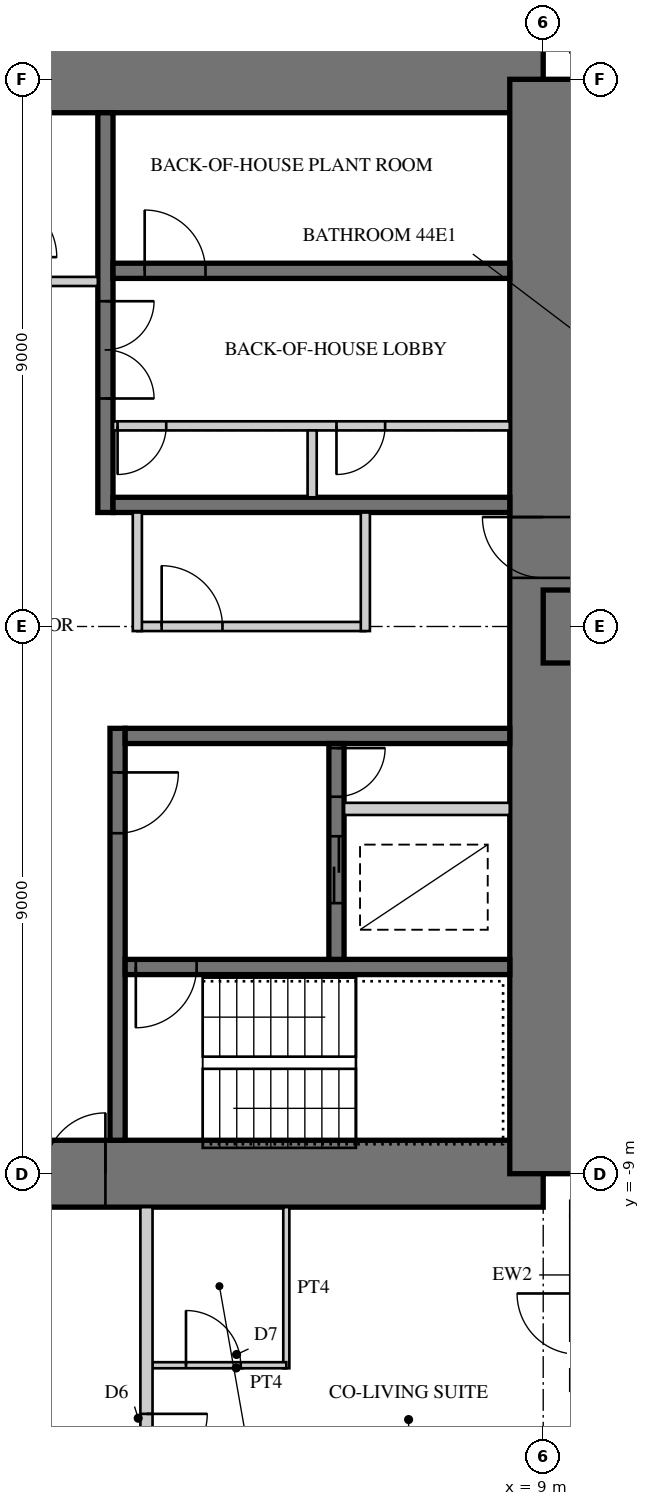
"""IFC4 building model, lengths in metres.
Left out: names, types, materials, properties, quantities, classifications, styles, units other than length and angle.
Written with IfcOpenShell. Run it as: python <this file> out.ifc"""

import sys

from ifc_helpers import new_model, si_unit, direction, frame, frame_2d, origin, place, context, subcontext, project, spatial, rectangle, extrude, element, fill, save


model = new_model("IFC4")
c1 = context("Model", 3, precision=1e-05, world=origin(), true_north=direction((0.0, 1.0)))
c2 = subcontext(c1, "Body", "Model", "MODEL_VIEW")
j1 = project(units=[si_unit("LENGTHUNIT", "METRE"), si_unit("PLANEANGLEUNIT", "RADIAN")], contexts=[c1])
p1 = place(None, origin())
s1 = spatial("IfcSite", under=j1, at=p1, CompositionType="ELEMENT")
p2 = place(p1, origin())
s2 = spatial("IfcBuilding", under=s1, at=p2, CompositionType="ELEMENT")
p3 = place(p2, frame((0.0, 0.0, 179.7)))
s3 = spatial("IfcBuildingStorey", under=s2, at=p3, CompositionType="ELEMENT", Elevation=179.7)
p4 = place(p3, frame((9.0, 9.0, 0.0), z_axis=(0.0, 0.0, 1.0), x_axis=(-1.0, 0.0, 0.0)))
e1 = element("IfcWall", 1, at=p4, inside=s3, PredefinedType="SHEAR", context=c2, shape_type="SweptSolid", body=[
    extrude(rectangle(XDim=18.0, YDim=1.1, at=frame_2d((9.0, 0.0))), origin(), (0.0, 0.0, 1.0), 3.4),
])
p5 = place(p4, frame((9.8, 0.0, 0.0)))
e2 = element("IfcOpeningElement", 2, at=p5, cuts=e1, PredefinedType="OPENING", context=c2, shape_type="SweptSolid", body=[
    extrude(rectangle(XDim=1.0, YDim=2.4, at=frame_2d((0.5, 1.2))), frame((0.0, 0.56, 0.0), z_axis=(0.0, -1.0, 0.0), x_axis=(1.0, 0.0, 0.0)), (0.0, 0.0, 1.0), 1.12),
])
p6 = place(p3, frame((-9.0, -9.0, 0.0), z_axis=(0.0, 0.0, 1.0), x_axis=(1.0, 0.0, 0.0)))
e3 = element("IfcWall", 3, at=p6, inside=s3, PredefinedType="SHEAR", context=c2, shape_type="SweptSolid", body=[
    extrude(rectangle(XDim=18.0, YDim=1.1, at=frame_2d((9.0, 0.0))), origin(), (0.0, 0.0, 1.0), 3.4),
])
p7 = place(p6, frame((9.8, 0.0, 0.0)))
e4 = element("IfcOpeningElement", 4, at=p7, cuts=e3, PredefinedType="OPENING", context=c2, shape_type="SweptSolid", body=[
    extrude(rectangle(XDim=1.0, YDim=2.4, at=frame_2d((0.5, 1.2))), frame((0.0, 0.56, 0.0), z_axis=(0.0, -1.0, 0.0), x_axis=(1.0, 0.0, 0.0)), (0.0, 0.0, 1.0), 1.12),
])
p8 = place(p3, frame((9.0, -9.0, 0.0), z_axis=(0.0, 0.0, 1.0), x_axis=(0.0, 1.0, 0.0)))
e5 = element("IfcWall", 5, at=p8, inside=s3, PredefinedType="SHEAR", context=c2, shape_type="SweptSolid", body=[
    extrude(rectangle(XDim=18.0, YDim=1.1, at=frame_2d((9.0, 0.0))), origin(), (0.0, 0.0, 1.0), 3.4),
])
p9 = place(p8, frame((9.8, 0.0, 0.0)))
e6 = element("IfcOpeningElement", 6, at=p9, cuts=e5, PredefinedType="OPENING", context=c2, shape_type="SweptSolid", body=[
    extrude(rectangle(XDim=1.0, YDim=2.4, at=frame_2d((0.5, 1.2))), frame((0.0, 0.56, 0.0), z_axis=(0.0, -1.0, 0.0), x_axis=(1.0, 0.0, 0.0)), (0.0, 0.0, 1.0), 1.12),
])
p10 = place(p3, frame((1.8, 1.875, 0.0), z_axis=(0.0, 0.0, 1.0), x_axis=(0.0, 1.0, 0.0)))
e7 = element("IfcWall", 7, at=p10, inside=s3, PredefinedType="SHEAR", context=c2, shape_type="SweptSolid", body=[
    extrude(rectangle(XDim=6.575, YDim=0.25, at=frame_2d((3.288, 0.0))), origin(), (0.0, 0.0, 1.0), 3.4),
])
p11 = place(p10, frame((1.875, 0.0, 0.0)))
e8 = element("IfcOpeningElement", 8, at=p11, cuts=e7, PredefinedType="OPENING", context=c2, shape_type="SweptSolid", body=[
    extrude(rectangle(XDim=1.6, YDim=2.4, at=frame_2d((0.8, 1.2))), frame((0.0, 0.135, 0.0), z_axis=(0.0, -1.0, 0.0), x_axis=(1.0, 0.0, 0.0)), (0.0, 0.0, 1.0), 0.27),
])
p12 = place(p3, frame((1.925, 2.0, 0.0), z_axis=(0.0, 0.0, 1.0), x_axis=(1.0, 0.0, 0.0)))
e9 = element("IfcWall", 9, at=p12, inside=s3, PredefinedType="SHEAR", context=c2, shape_type="SweptSolid", body=[
    extrude(rectangle(XDim=6.525, YDim=0.25, at=frame_2d((3.262, 0.0))), origin(), (0.0, 0.0, 1.0), 3.4),
])
p13 = place(p3, frame((1.925, 5.85, 0.0), z_axis=(0.0, 0.0, 1.0), x_axis=(1.0, 0.0, 0.0)))
e10 = element("IfcWall", 10, at=p13, inside=s3, PredefinedType="SHEAR", context=c2, shape_type="SweptSolid", body=[
    extrude(rectangle(XDim=6.525, YDim=0.25, at=frame_2d((3.262, 0.0))), origin(), (0.0, 0.0, 1.0), 3.4),
])
p14 = place(p13, frame((0.521, 0.0, 0.0)))
e11 = element("IfcOpeningElement", 11, at=p14, cuts=e10, PredefinedType="OPENING", context=c2, shape_type="SweptSolid", body=[
    extrude(rectangle(XDim=1.0, YDim=2.1, at=frame_2d((0.5, 1.05))), frame((0.0, 0.135, 0.0), z_axis=(0.0, -1.0, 0.0), x_axis=(1.0, 0.0, 0.0)), (0.0, 0.0, 1.0), 0.27),
])
p15 = place(p3, frame((1.925, 3.3, 0.0), z_axis=(0.0, 0.0, 1.0), x_axis=(1.0, 0.0, 0.0)))
e12 = element("IfcWall", 12, at=p15, inside=s3, PredefinedType="PARTITIONING", context=c2, shape_type="SweptSolid", body=[
    extrude(rectangle(XDim=6.525, YDim=0.15, at=frame_2d((3.262, 0.0))), origin(), (0.0, 0.0, 1.0), 3.4),
])
p16 = place(p15, frame((0.075, 0.0, 0.0)))
e13 = element("IfcOpeningElement", 13, at=p16, cuts=e12, PredefinedType="OPENING", context=c2, shape_type="SweptSolid", body=[
    extrude(rectangle(XDim=0.8, YDim=2.1, at=frame_2d((0.4, 1.05))), frame((0.0, 0.085, 0.0), z_axis=(0.0, -1.0, 0.0), x_axis=(1.0, 0.0, 0.0)), (0.0, 0.0, 1.0), 0.17),
])
p17 = place(p15, frame((3.675, 0.0, 0.0)))
e14 = element("IfcOpeningElement", 14, at=p17, cuts=e12, PredefinedType="OPENING", context=c2, shape_type="SweptSolid", body=[
    extrude(rectangle(XDim=0.8, YDim=2.1, at=frame_2d((0.4, 1.05))), frame((0.0, 0.085, 0.0), z_axis=(0.0, -1.0, 0.0), x_axis=(1.0, 0.0, 0.0)), (0.0, 0.0, 1.0), 0.17),
])
p18 = place(p3, frame((5.2, 2.125, 0.0), z_axis=(0.0, 0.0, 1.0), x_axis=(0.0, 1.0, 0.0)))
e15 = element("IfcWall", 15, at=p18, inside=s3, PredefinedType="PARTITIONING", context=c2, shape_type="SweptSolid", body=[
    extrude(rectangle(XDim=1.1, YDim=0.15, at=frame_2d((0.55, 0.0))), origin(), (0.0, 0.0, 1.0), 3.4),
])
p19 = place(p3, frame((2.0, -1.675, 0.0), z_axis=(0.0, 0.0, 1.0), x_axis=(0.0, -1.0, 0.0)))
e16 = element("IfcWall", 16, at=p19, inside=s3, PredefinedType="SHEAR", context=c2, shape_type="SweptSolid", body=[
    extrude(rectangle(XDim=6.775, YDim=0.25, at=frame_2d((3.387, 0.0))), origin(), (0.0, 0.0, 1.0), 3.4),
])
p20 = place(p19, frame((0.725, 0.0, 0.0)))
e17 = element("IfcOpeningElement", 17, at=p20, cuts=e16, PredefinedType="OPENING", context=c2, shape_type="SweptSolid", body=[
    extrude(rectangle(XDim=1.0, YDim=2.1, at=frame_2d((0.5, 1.05))), frame((0.0, 0.135, 0.0), z_axis=(0.0, -1.0, 0.0), x_axis=(1.0, 0.0, 0.0)), (0.0, 0.0, 1.0), 0.27),
])
p21 = place(p3, frame((2.125, -1.8, 0.0), z_axis=(0.0, 0.0, 1.0), x_axis=(1.0, 0.0, 0.0)))
e18 = element("IfcWall", 18, at=p21, inside=s3, PredefinedType="SHEAR", context=c2, shape_type="SweptSolid", body=[
    extrude(rectangle(XDim=6.325, YDim=0.25, at=frame_2d((3.163, 0.0))), origin(), (0.0, 0.0, 1.0), 3.4),
])
p22 = place(p3, frame((2.125, -5.6, 0.0), z_axis=(0.0, 0.0, 1.0), x_axis=(1.0, 0.0, 0.0)))
e19 = element("IfcWall", 19, at=p22, inside=s3, PredefinedType="SHEAR", context=c2, shape_type="SweptSolid", body=[
    extrude(rectangle(XDim=6.325, YDim=0.25, at=frame_2d((3.163, 0.0))), origin(), (0.0, 0.0, 1.0), 3.4),
])
p23 = place(p22, frame((0.175, 0.0, 0.0)))
e20 = element("IfcOpeningElement", 20, at=p23, cuts=e19, PredefinedType="OPENING", context=c2, shape_type="SweptSolid", body=[
    extrude(rectangle(XDim=1.0, YDim=2.1, at=frame_2d((0.5, 1.05))), frame((0.0, 0.135, 0.0), z_axis=(0.0, -1.0, 0.0), x_axis=(1.0, 0.0, 0.0)), (0.0, 0.0, 1.0), 0.27),
])
p24 = place(p3, frame((5.6, -1.925, 0.0), z_axis=(0.0, 0.0, 1.0), x_axis=(0.0, -1.0, 0.0)))
e21 = element("IfcWall", 21, at=p24, inside=s3, PredefinedType="SHEAR", context=c2, shape_type="SweptSolid", body=[
    extrude(rectangle(XDim=3.55, YDim=0.25, at=frame_2d((1.775, 0.0))), origin(), (0.0, 0.0, 1.0), 3.4),
])
p25 = place(p24, frame((1.525, 0.0, 0.0)))
e22 = element("IfcOpeningElement", 22, at=p25, cuts=e21, PredefinedType="OPENING", context=c2, shape_type="SweptSolid", body=[
    extrude(rectangle(XDim=1.1, YDim=2.2, at=frame_2d((0.55, 1.1))), frame((0.0, 0.135, 0.0), z_axis=(0.0, -1.0, 0.0), x_axis=(1.0, 0.0, 0.0)), (0.0, 0.0, 1.0), 0.27),
])
p26 = place(p24, frame((0.075, 0.0, 0.0)))
e23 = element("IfcOpeningElement", 23, at=p26, cuts=e21, PredefinedType="OPENING", context=c2, shape_type="SweptSolid", body=[
    extrude(rectangle(XDim=0.8, YDim=2.1, at=frame_2d((0.4, 1.05))), frame((0.0, 0.135, 0.0), z_axis=(0.0, -1.0, 0.0), x_axis=(1.0, 0.0, 0.0)), (0.0, 0.0, 1.0), 0.27),
])
p27 = place(p3, frame((5.725, -3.0, 0.0), z_axis=(0.0, 0.0, 1.0), x_axis=(1.0, 0.0, 0.0)))
e24 = element("IfcWall", 24, at=p27, inside=s3, PredefinedType="PARTITIONING", context=c2, shape_type="SweptSolid", body=[
    extrude(rectangle(XDim=2.725, YDim=0.2, at=frame_2d((1.362, 0.0))), origin(), (0.0, 0.0, 1.0), 3.4),
])
p28 = place(p3, frame((9.0, 0.0, 0.0), z_axis=(0.0, 0.0, 1.0), x_axis=(1.0, 0.0, 0.0)))
e25 = element("IfcWall", 25, at=p28, inside=s3, PredefinedType="SHEAR", context=c2, shape_type="SweptSolid", body=[
    extrude(rectangle(XDim=9.0, YDim=1.2, at=frame_2d((4.5, 0.0))), origin(), (0.0, 0.0, 1.0), 3.4),
])
p29 = place(p28, frame((3.95, 0.0, 0.0)))
e26 = element("IfcOpeningElement", 26, at=p29, cuts=e25, PredefinedType="OPENING", context=c2, shape_type="SweptSolid", body=[
    extrude(rectangle(XDim=1.0, YDim=2.15, at=frame_2d((0.5, 1.075))), frame((0.0, 0.61, 0.0), z_axis=(0.0, -1.0, 0.0), x_axis=(1.0, 0.0, 0.0)), (0.0, 0.0, 1.0), 1.22),
])
p30 = place(p28, frame((7.0, 0.0, 0.0)))
e27 = element("IfcOpeningElement", 27, at=p30, cuts=e25, PredefinedType="OPENING", context=c2, shape_type="SweptSolid", body=[
    extrude(rectangle(XDim=1.0, YDim=2.2, at=frame_2d((0.5, 1.1))), frame((0.0, 0.61, 0.0), z_axis=(0.0, -1.0, 0.0), x_axis=(1.0, 0.0, 0.0)), (0.0, 0.0, 1.0), 1.22),
])
p31 = place(p3, frame((9.445, -9.57, 0.0), z_axis=(0.0, 0.0, 1.0), x_axis=(1.0, 0.0, 0.0)))
e28 = element("IfcWall", 28, at=p31, inside=s3, PredefinedType="SOLIDWALL", context=c2, shape_type="SweptSolid", body=[
    extrude(rectangle(XDim=3.125, YDim=0.25, at=frame_2d((1.562, 0.0))), origin(), (0.0, 0.0, 1.0), 3.22),
])
p32 = place(p31, frame((0.6, 0.0, 0.0)))
e29 = element("IfcOpeningElement", 29, at=p32, cuts=e28, PredefinedType="OPENING", context=c2, shape_type="SweptSolid", body=[
    extrude(rectangle(XDim=1.0, YDim=2.2, at=frame_2d((0.5, 1.1))), frame((0.0, 0.135, 0.0), z_axis=(0.0, -1.0, 0.0), x_axis=(1.0, 0.0, 0.0)), (0.0, 0.0, 1.0), 0.27),
])
p33 = place(p3, frame((9.57, 9.445, 0.0), z_axis=(0.0, 0.0, 1.0), x_axis=(0.0, 1.0, 0.0)))
e30 = element("IfcWall", 30, at=p33, inside=s3, PredefinedType="SOLIDWALL", context=c2, shape_type="SweptSolid", body=[
    extrude(rectangle(XDim=3.125, YDim=0.25, at=frame_2d((1.562, 0.0))), origin(), (0.0, 0.0, 1.0), 3.22),
])
p34 = place(p33, frame((0.6, 0.0, 0.0)))
e31 = element("IfcOpeningElement", 31, at=p34, cuts=e30, PredefinedType="OPENING", context=c2, shape_type="SweptSolid", body=[
    extrude(rectangle(XDim=1.0, YDim=2.2, at=frame_2d((0.5, 1.1))), frame((0.0, 0.135, 0.0), z_axis=(0.0, -1.0, 0.0), x_axis=(1.0, 0.0, 0.0)), (0.0, 0.0, 1.0), 0.27),
])
p35 = place(p3, frame((9.57, -12.57, 0.0), z_axis=(0.0, 0.0, 1.0), x_axis=(0.0, 1.0, 0.0)))
e32 = element("IfcWall", 32, at=p35, inside=s3, PredefinedType="SOLIDWALL", context=c2, shape_type="SweptSolid", body=[
    extrude(rectangle(XDim=2.875, YDim=0.25, at=frame_2d((1.438, 0.0))), origin(), (0.0, 0.0, 1.0), 3.22),
])
p36 = place(p35, frame((0.6, 0.0, 0.0)))
e33 = element("IfcOpeningElement", 33, at=p36, cuts=e32, PredefinedType="OPENING", context=c2, shape_type="SweptSolid", body=[
    extrude(rectangle(XDim=1.0, YDim=2.2, at=frame_2d((0.5, 1.1))), frame((0.0, 0.135, 0.0), z_axis=(0.0, -1.0, 0.0), x_axis=(1.0, 0.0, 0.0)), (0.0, 0.0, 1.0), 0.27),
])
p37 = place(p3, frame((2.325, 0.0, 0.0), z_axis=(0.0, 0.0, 1.0), x_axis=(1.0, 0.0, 0.0)))
e34 = element("IfcWall", 34, at=p37, inside=s3, PredefinedType="PARTITIONING", context=c2, shape_type="SweptSolid", body=[
    extrude(rectangle(XDim=3.75, YDim=0.15, at=frame_2d((1.875, 0.0))), origin(), (0.0, 0.0, 1.0), 3.22),
])
p38 = place(p37, frame((0.4, 0.0, 0.0)))
e35 = element("IfcOpeningElement", 35, at=p38, cuts=e34, PredefinedType="OPENING", context=c2, shape_type="SweptSolid", body=[
    extrude(rectangle(XDim=1.0, YDim=2.1, at=frame_2d((0.5, 1.05))), frame((0.0, 0.085, 0.0), z_axis=(0.0, -1.0, 0.0), x_axis=(1.0, 0.0, 0.0)), (0.0, 0.0, 1.0), 0.17),
])
for number, where, z_axis, x_axis in (
    (36, (2.325, 1.875, 0.0), (0.0, 0.0, 1.0), (0.0, -1.0, 0.0)),
    (37, (6.075, -0.075, 0.0), (0.0, 0.0, 1.0), (0.0, 1.0, 0.0)),
):
    element("IfcWall", number, at=place(p3, frame(where, z_axis=z_axis, x_axis=x_axis)), inside=s3, PredefinedType="PARTITIONING", context=c2, shape_type="SweptSolid", body=[
        extrude(rectangle(XDim=1.95, YDim=0.15, at=frame_2d((0.975, 0.0))), origin(), (0.0, 0.0, 1.0), 3.22),
    ])
p39 = place(p3, frame((1.675, 5.675, 0.0), z_axis=(0.0, 0.0, 1.0), x_axis=(-1.0, 0.0, 0.0)))
e38 = element("IfcWall", 38, at=p39, inside=s3, PredefinedType="PARTITIONING", context=c2, shape_type="SweptSolid", body=[
    extrude(rectangle(XDim=1.75, YDim=0.15, at=frame_2d((0.875, 0.0))), origin(), (0.0, 0.0, 1.0), 3.22),
])
p40 = place(p3, frame((4.775, -9.55, 0.0), z_axis=(0.0, 0.0, 1.0), x_axis=(0.0, -1.0, 0.0)))
e39 = element("IfcWall", 39, at=p40, inside=s3, PredefinedType="PARTITIONING", context=c2, shape_type="SweptSolid", body=[
    extrude(rectangle(XDim=2.65, YDim=0.1, at=frame_2d((1.325, 0.0))), origin(), (0.0, 0.0, 1.0), 3.22),
])
p41 = place(p3, frame((2.575, -12.15, 0.0), z_axis=(0.0, 0.0, 1.0), x_axis=(1.0, 0.0, 0.0)))
e40 = element("IfcWall", 40, at=p41, inside=s3, PredefinedType="PARTITIONING", context=c2, shape_type="SweptSolid", body=[
    extrude(rectangle(XDim=2.2, YDim=0.1, at=frame_2d((1.1, 0.0))), origin(), (0.0, 0.0, 1.0), 3.22),
])
p42 = place(p41, frame((0.55, 0.0, 0.0)))
e41 = element("IfcOpeningElement", 41, at=p42, cuts=e40, PredefinedType="OPENING", context=c2, shape_type="SweptSolid", body=[
    extrude(rectangle(XDim=0.9, YDim=2.1, at=frame_2d((0.45, 1.05))), frame((0.0, 0.06, 0.0), z_axis=(0.0, -1.0, 0.0), x_axis=(1.0, 0.0, 0.0)), (0.0, 0.0, 1.0), 0.12),
])
p43 = place(p3, frame((2.475, -9.55, 0.0), z_axis=(0.0, 0.0, 1.0), x_axis=(0.0, -1.0, 0.0)))
e42 = element("IfcWall", 42, at=p43, inside=s3, PredefinedType="SOLIDWALL", context=c2, shape_type="SweptSolid", body=[
    extrude(rectangle(XDim=11.45, YDim=0.2, at=frame_2d((5.725, 0.0))), origin(), (0.0, 0.0, 1.0), 3.22),
])
p44 = place(p43, frame((3.4, 0.0, 0.0)))
e43 = element("IfcOpeningElement", 43, at=p44, cuts=e42, PredefinedType="OPENING", context=c2, shape_type="SweptSolid", body=[
    extrude(rectangle(XDim=1.0, YDim=2.15, at=frame_2d((0.5, 1.075))), frame((0.0, 0.11, 0.0), z_axis=(0.0, -1.0, 0.0), x_axis=(1.0, 0.0, 0.0)), (0.0, 0.0, 1.0), 0.22),
])
p45 = place(p38, origin())
e44 = element("IfcDoor", 44, at=p45, inside=s3, OperationType="SINGLE_SWING_LEFT", PredefinedType="DOOR", context=c2, shape_type="SweptSolid", body=[
    extrude(rectangle(XDim=1.0, YDim=2.1, at=frame_2d((0.5, 1.05))), frame((0.0, 0.025, 0.0), z_axis=(0.0, -1.0, 0.0), x_axis=(1.0, 0.0, 0.0)), (0.0, 0.0, 1.0), 0.05),
])
fill(e35, e44)
p46 = place(p42, origin())
e45 = element("IfcDoor", 45, at=p46, inside=s3, OperationType="SINGLE_SWING_LEFT", PredefinedType="DOOR", context=c2, shape_type="SweptSolid", body=[
    extrude(rectangle(XDim=0.9, YDim=2.1, at=frame_2d((0.45, 1.05))), frame((0.0, 0.025, 0.0), z_axis=(0.0, -1.0, 0.0), x_axis=(1.0, 0.0, 0.0)), (0.0, 0.0, 1.0), 0.05),
])
fill(e41, e45)
p47 = place(p44, origin())
e46 = element("IfcDoor", 46, at=p47, inside=s3, OperationType="SINGLE_SWING_LEFT", PredefinedType="DOOR", context=c2, shape_type="SweptSolid", body=[
    extrude(rectangle(XDim=1.0, YDim=2.15, at=frame_2d((0.5, 1.075))), frame((0.0, 0.025, 0.0), z_axis=(0.0, -1.0, 0.0), x_axis=(1.0, 0.0, 0.0)), (0.0, 0.0, 1.0), 0.05),
])
fill(e43, e46)
p48 = place(p7, origin())
e47 = element("IfcDoor", 47, at=p48, inside=s3, OperationType="SINGLE_SWING_RIGHT", PredefinedType="DOOR", context=c2, shape_type="SweptSolid", body=[
    extrude(rectangle(XDim=1.0, YDim=2.4, at=frame_2d((0.5, 1.2))), frame((0.0, 0.055, 0.0), z_axis=(0.0, -1.0, 0.0), x_axis=(1.0, 0.0, 0.0)), (0.0, 0.0, 1.0), 0.05),
])
fill(e4, e47)
p49 = place(p9, origin())
e48 = element("IfcDoor", 48, at=p49, inside=s3, OperationType="SINGLE_SWING_RIGHT", PredefinedType="DOOR", context=c2, shape_type="SweptSolid", body=[
    extrude(rectangle(XDim=1.0, YDim=2.4, at=frame_2d((0.5, 1.2))), frame((0.0, 0.055, 0.0), z_axis=(0.0, -1.0, 0.0), x_axis=(1.0, 0.0, 0.0)), (0.0, 0.0, 1.0), 0.05),
])
fill(e6, e48)
p50 = place(p11, frame((1.6, 0.0, 0.0), z_axis=(0.0, 0.0, 1.0), x_axis=(-1.0, 0.0, 0.0)))
e49 = element("IfcDoor", 49, at=p50, inside=s3, OperationType="DOUBLE_DOOR_SINGLE_SWING", PredefinedType="DOOR", context=c2, shape_type="SweptSolid", body=[
    extrude(rectangle(XDim=1.6, YDim=2.4, at=frame_2d((0.8, 1.2))), frame((0.0, 0.025, 0.0), z_axis=(0.0, -1.0, 0.0), x_axis=(1.0, 0.0, 0.0)), (0.0, 0.0, 1.0), 0.05),
])
fill(e8, e49)
p51 = place(p16, frame((0.8, 0.0, 0.0), z_axis=(0.0, 0.0, 1.0), x_axis=(-1.0, 0.0, 0.0)))
e50 = element("IfcDoor", 50, at=p51, inside=s3, OperationType="SINGLE_SWING_RIGHT", PredefinedType="DOOR", context=c2, shape_type="SweptSolid", body=[
    extrude(rectangle(XDim=0.8, YDim=2.1, at=frame_2d((0.4, 1.05))), frame((0.0, 0.025, 0.0), z_axis=(0.0, -1.0, 0.0), x_axis=(1.0, 0.0, 0.0)), (0.0, 0.0, 1.0), 0.05),
])
fill(e13, e50)
p52 = place(p17, frame((0.8, 0.0, 0.0), z_axis=(0.0, 0.0, 1.0), x_axis=(-1.0, 0.0, 0.0)))
e51 = element("IfcDoor", 51, at=p52, inside=s3, OperationType="SINGLE_SWING_RIGHT", PredefinedType="DOOR", context=c2, shape_type="SweptSolid", body=[
    extrude(rectangle(XDim=0.8, YDim=2.1, at=frame_2d((0.4, 1.05))), frame((0.0, 0.025, 0.0), z_axis=(0.0, -1.0, 0.0), x_axis=(1.0, 0.0, 0.0)), (0.0, 0.0, 1.0), 0.05),
])
fill(e14, e51)
p53 = place(p20, origin())
e52 = element("IfcDoor", 52, at=p53, inside=s3, OperationType="SINGLE_SWING_LEFT", PredefinedType="DOOR", context=c2, shape_type="SweptSolid", body=[
    extrude(rectangle(XDim=1.0, YDim=2.1, at=frame_2d((0.5, 1.05))), frame((0.0, 0.025, 0.0), z_axis=(0.0, -1.0, 0.0), x_axis=(1.0, 0.0, 0.0)), (0.0, 0.0, 1.0), 0.05),
])
fill(e17, e52)
p54 = place(p23, frame((1.0, 0.0, 0.0), z_axis=(0.0, 0.0, 1.0), x_axis=(-1.0, 0.0, 0.0)))
e53 = element("IfcDoor", 53, at=p54, inside=s3, OperationType="SINGLE_SWING_RIGHT", PredefinedType="DOOR", context=c2, shape_type="SweptSolid", body=[
    extrude(rectangle(XDim=1.0, YDim=2.1, at=frame_2d((0.5, 1.05))), frame((0.0, 0.025, 0.0), z_axis=(0.0, -1.0, 0.0), x_axis=(1.0, 0.0, 0.0)), (0.0, 0.0, 1.0), 0.05),
])
fill(e20, e53)
p55 = place(p25, origin())
e54 = element("IfcDoor", 54, at=p55, inside=s3, OperationType="DOUBLE_DOOR_SLIDING", PredefinedType="DOOR", context=c2, shape_type="SweptSolid", body=[
    extrude(rectangle(XDim=1.1, YDim=2.2, at=frame_2d((0.55, 1.1))), frame((0.0, 0.025, 0.0), z_axis=(0.0, -1.0, 0.0), x_axis=(1.0, 0.0, 0.0)), (0.0, 0.0, 1.0), 0.05),
])
fill(e22, e54)
p56 = place(p26, origin())
e55 = element("IfcDoor", 55, at=p56, inside=s3, OperationType="SINGLE_SWING_LEFT", PredefinedType="DOOR", context=c2, shape_type="SweptSolid", body=[
    extrude(rectangle(XDim=0.8, YDim=2.1, at=frame_2d((0.4, 1.05))), frame((0.0, 0.025, 0.0), z_axis=(0.0, -1.0, 0.0), x_axis=(1.0, 0.0, 0.0)), (0.0, 0.0, 1.0), 0.05),
])
fill(e23, e55)
p57 = place(p14, origin())
e56 = element("IfcDoor", 56, at=p57, inside=s3, OperationType="SINGLE_SWING_LEFT", PredefinedType="DOOR", context=c2, shape_type="SweptSolid", body=[
    extrude(rectangle(XDim=1.0, YDim=2.1, at=frame_2d((0.5, 1.05))), frame((0.0, 0.025, 0.0), z_axis=(0.0, -1.0, 0.0), x_axis=(1.0, 0.0, 0.0)), (0.0, 0.0, 1.0), 0.05),
])
fill(e11, e56)
save(model, sys.argv[1])
